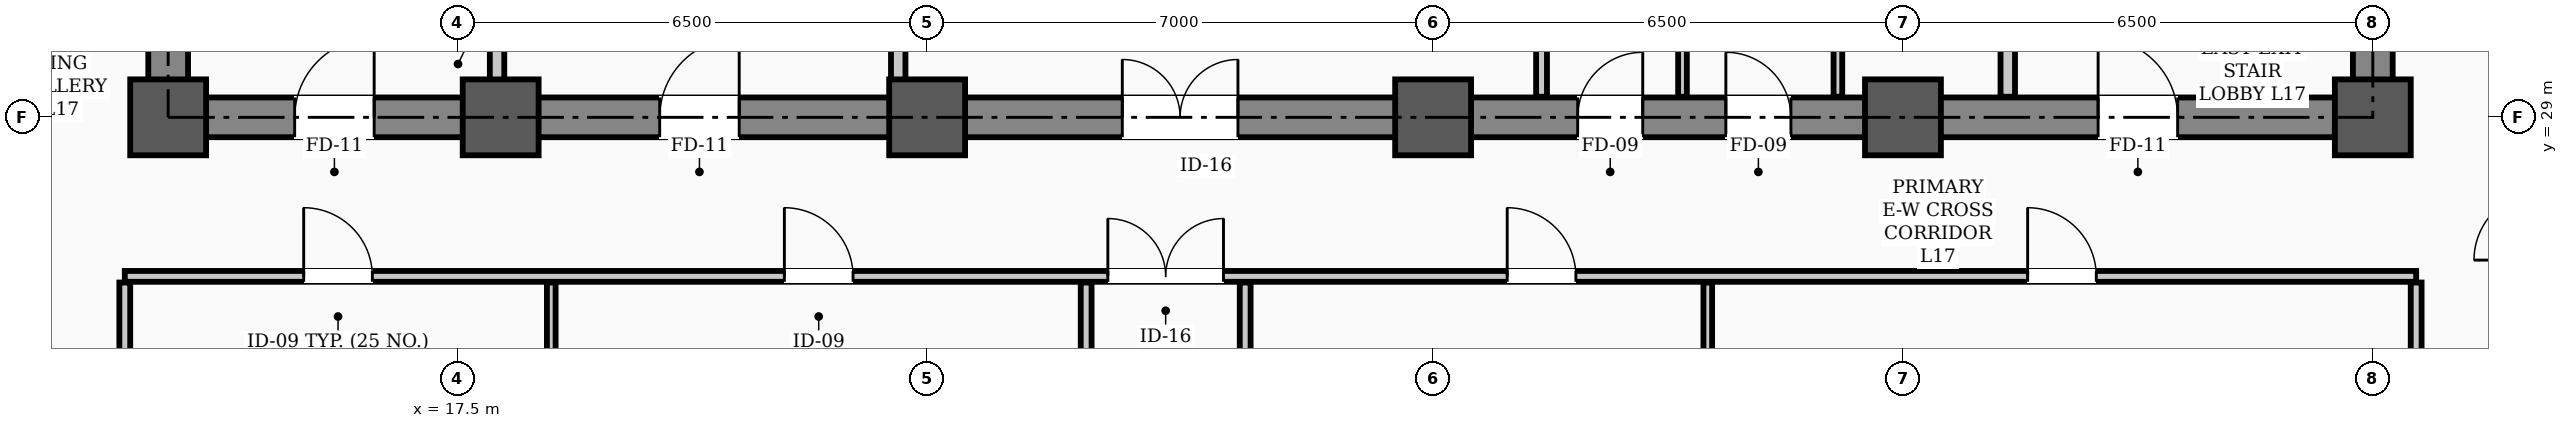
"""IFC4 building model, lengths in metres.
Left out: names, types, materials, properties, quantities, classifications, styles, units other than length and angle.
Written with IfcOpenShell. Run it as: python <this file> out.ifc"""

import sys

from ifc_helpers import new_model, si_unit, direction, frame, frame_2d, origin, origin_2d, place, context, subcontext, project, spatial, rectangle, hollow_rectangle, extrude, element, fill, save


model = new_model("IFC4")
c1 = context("Model", 3, precision=1e-05, world=origin(), true_north=direction((0.0, 1.0)))
c2 = subcontext(c1, "Body", "Model", "MODEL_VIEW")
j1 = project(units=[si_unit("LENGTHUNIT", "METRE"), si_unit("PLANEANGLEUNIT", "RADIAN")], contexts=[c1])
p1 = place(None, origin())
s1 = spatial("IfcSite", under=j1, at=p1, CompositionType="ELEMENT")
p2 = place(p1, origin())
s2 = spatial("IfcBuilding", under=s1, at=p2, CompositionType="ELEMENT")
p3 = place(p2, frame((0.0, 0.0, 69.4)))
s3 = spatial("IfcBuildingStorey", under=s2, at=p3, CompositionType="ELEMENT", Elevation=69.4)
for number, where, z_axis, x_axis in (
    (1, (13.5, 29.0, 0.0), (0.0, 0.0, 1.0), (1.0, 0.0, 0.0)),
    (2, (18.1, 29.0, 0.0), (0.0, 0.0, 1.0), (1.0, 0.0, 0.0)),
    (3, (24.0, 29.0, 0.0), (0.0, 0.0, 1.0), (1.0, 0.0, 0.0)),
    (4, (31.0, 29.0, 0.0), (0.0, 0.0, 1.0), (1.0, 0.0, 0.0)),
    (5, (37.5, 29.0, 0.0), (0.0, 0.0, 1.0), (1.0, 0.0, 0.0)),
    (6, (44.0, 29.0, 0.0), (0.0, 0.0, 1.0), (1.0, 0.0, 0.0)),
):
    element("IfcColumn", number, at=place(p3, frame(where, z_axis=z_axis, x_axis=x_axis)), inside=s3, PredefinedType="COLUMN", context=c2, shape_type="SweptSolid", body=[
        extrude(hollow_rectangle(XDim=1.05, YDim=1.05, WallThickness=0.038, InnerFilletRadius=0.019, OuterFilletRadius=0.057, at=origin_2d()), origin(), (0.0, 0.0, 1.0), 3.9),
    ])
p4 = place(p3, frame((13.5, 29.0, 0.0), z_axis=(0.0, 0.0, 1.0), x_axis=(1.0, 0.0, 0.0)))
e7 = element("IfcWall", 7, at=p4, inside=s3, PredefinedType="SHEAR", context=c2, shape_type="SweptSolid", body=[
    extrude(rectangle(XDim=30.5, YDim=0.55, at=frame_2d((15.25, 0.0))), origin(), (0.0, 0.0, 1.0), 3.72),
])
p5 = place(p4, frame((1.75, 0.0, 0.0)))
e8 = element("IfcOpeningElement", 8, at=p5, cuts=e7, PredefinedType="OPENING", context=c2, shape_type="SweptSolid", body=[
    extrude(rectangle(XDim=1.1, YDim=2.08, at=frame_2d((0.55, 1.04))), frame((0.0, 0.285, 0.0), z_axis=(0.0, -1.0, 0.0), x_axis=(1.0, 0.0, 0.0)), (0.0, 0.0, 1.0), 0.57),
])
p6 = place(p4, frame((26.7, 0.0, 0.0)))
e9 = element("IfcOpeningElement", 9, at=p6, cuts=e7, PredefinedType="OPENING", context=c2, shape_type="SweptSolid", body=[
    extrude(rectangle(XDim=1.1, YDim=2.08, at=frame_2d((0.55, 1.04))), frame((0.0, 0.285, 0.0), z_axis=(0.0, -1.0, 0.0), x_axis=(1.0, 0.0, 0.0)), (0.0, 0.0, 1.0), 0.57),
])
p7 = place(p4, frame((6.8, 0.0, 0.0)))
e10 = element("IfcOpeningElement", 10, at=p7, cuts=e7, PredefinedType="OPENING", context=c2, shape_type="SweptSolid", body=[
    extrude(rectangle(XDim=1.1, YDim=2.08, at=frame_2d((0.55, 1.04))), frame((0.0, 0.285, 0.0), z_axis=(0.0, -1.0, 0.0), x_axis=(1.0, 0.0, 0.0)), (0.0, 0.0, 1.0), 0.57),
])
p8 = place(p4, frame((13.2, 0.0, 0.0)))
e11 = element("IfcOpeningElement", 11, at=p8, cuts=e7, PredefinedType="OPENING", context=c2, shape_type="SweptSolid", body=[
    extrude(rectangle(XDim=1.6, YDim=2.08, at=frame_2d((0.8, 1.04))), frame((0.0, 0.285, 0.0), z_axis=(0.0, -1.0, 0.0), x_axis=(1.0, 0.0, 0.0)), (0.0, 0.0, 1.0), 0.57),
])
p9 = place(p4, frame((19.5, 0.0, 0.0)))
e12 = element("IfcOpeningElement", 12, at=p9, cuts=e7, PredefinedType="OPENING", context=c2, shape_type="SweptSolid", body=[
    extrude(rectangle(XDim=0.9, YDim=2.08, at=frame_2d((0.45, 1.04))), frame((0.0, 0.285, 0.0), z_axis=(0.0, -1.0, 0.0), x_axis=(1.0, 0.0, 0.0)), (0.0, 0.0, 1.0), 0.57),
])
p10 = place(p4, frame((21.55, 0.0, 0.0)))
e13 = element("IfcOpeningElement", 13, at=p10, cuts=e7, PredefinedType="OPENING", context=c2, shape_type="SweptSolid", body=[
    extrude(rectangle(XDim=0.9, YDim=2.08, at=frame_2d((0.45, 1.04))), frame((0.0, 0.285, 0.0), z_axis=(0.0, -1.0, 0.0), x_axis=(1.0, 0.0, 0.0)), (0.0, 0.0, 1.0), 0.57),
])
for number, where, z_axis, x_axis in (
    (14, (13.5, 29.35, 0.0), (0.0, 0.0, 1.0), (0.0, 1.0, 0.0)),
    (15, (44.0, 29.35, 0.0), (0.0, 0.0, 1.0), (0.0, 1.0, 0.0)),
):
    element("IfcWall", number, at=place(p3, frame(where, z_axis=z_axis, x_axis=x_axis)), inside=s3, PredefinedType="SHEAR", context=c2, shape_type="SweptSolid", body=[
        extrude(rectangle(XDim=8.6, YDim=0.55, at=frame_2d((4.3, 0.0))), origin(), (0.0, 0.0, 1.0), 3.72),
    ])
p11 = place(p3, frame((12.9, 26.8, 0.0), z_axis=(0.0, 0.0, 1.0), x_axis=(1.0, 0.0, 0.0)))
e16 = element("IfcWall", 16, at=p11, inside=s3, PredefinedType="PARTITIONING", context=c2, shape_type="SweptSolid", body=[
    extrude(rectangle(XDim=31.7, YDim=0.15, at=frame_2d((15.85, 0.0))), origin(), (0.0, 0.0, 1.0), 3.1),
])
p12 = place(p11, frame((13.6, 0.0, 0.0)))
e17 = element("IfcOpeningElement", 17, at=p12, cuts=e16, PredefinedType="OPENING", context=c2, shape_type="SweptSolid", body=[
    extrude(rectangle(XDim=1.6, YDim=2.08, at=frame_2d((0.8, 1.04))), frame((0.0, 0.085, 0.0), z_axis=(0.0, -1.0, 0.0), x_axis=(1.0, 0.0, 0.0)), (0.0, 0.0, 1.0), 0.17),
])
p13 = place(p11, frame((2.475, 0.0, 0.0)))
e18 = element("IfcOpeningElement", 18, at=p13, cuts=e16, PredefinedType="OPENING", context=c2, shape_type="SweptSolid", body=[
    extrude(rectangle(XDim=0.95, YDim=2.08, at=frame_2d((0.475, 1.04))), frame((0.0, 0.085, 0.0), z_axis=(0.0, -1.0, 0.0), x_axis=(1.0, 0.0, 0.0)), (0.0, 0.0, 1.0), 0.17),
])
p14 = place(p11, frame((9.125, 0.0, 0.0)))
e19 = element("IfcOpeningElement", 19, at=p14, cuts=e16, PredefinedType="OPENING", context=c2, shape_type="SweptSolid", body=[
    extrude(rectangle(XDim=0.95, YDim=2.08, at=frame_2d((0.475, 1.04))), frame((0.0, 0.085, 0.0), z_axis=(0.0, -1.0, 0.0), x_axis=(1.0, 0.0, 0.0)), (0.0, 0.0, 1.0), 0.17),
])
p15 = place(p11, frame((19.125, 0.0, 0.0)))
e20 = element("IfcOpeningElement", 20, at=p15, cuts=e16, PredefinedType="OPENING", context=c2, shape_type="SweptSolid", body=[
    extrude(rectangle(XDim=0.95, YDim=2.08, at=frame_2d((0.475, 1.04))), frame((0.0, 0.085, 0.0), z_axis=(0.0, -1.0, 0.0), x_axis=(1.0, 0.0, 0.0)), (0.0, 0.0, 1.0), 0.17),
])
p16 = place(p11, frame((26.325, 0.0, 0.0)))
e21 = element("IfcOpeningElement", 21, at=p16, cuts=e16, PredefinedType="OPENING", context=c2, shape_type="SweptSolid", body=[
    extrude(rectangle(XDim=0.95, YDim=2.08, at=frame_2d((0.475, 1.04))), frame((0.0, 0.085, 0.0), z_axis=(0.0, -1.0, 0.0), x_axis=(1.0, 0.0, 0.0)), (0.0, 0.0, 1.0), 0.17),
])
for number, where, z_axis, x_axis in (
    (22, (18.05, 29.285, 0.0), (0.0, 0.0, 1.0), (0.0, 1.0, 0.0)),
    (23, (38.95, 29.285, 0.0), (0.0, 0.0, 1.0), (0.0, 1.0, 0.0)),
):
    element("IfcWall", number, at=place(p3, frame(where, z_axis=z_axis, x_axis=x_axis)), inside=s3, PredefinedType="STANDARD", context=c2, shape_type="SweptSolid", body=[
        extrude(rectangle(XDim=1.015, YDim=0.2, at=frame_2d((0.508, 0.0))), origin(), (0.0, 0.0, 1.0), 3.3),
    ])
p17 = place(p3, frame((23.6, 29.285, 0.0), z_axis=(0.0, 0.0, 1.0), x_axis=(0.0, 1.0, 0.0)))
e24 = element("IfcWall", 24, at=p17, inside=s3, PredefinedType="STANDARD", context=c2, shape_type="SweptSolid", body=[
    extrude(rectangle(XDim=5.415, YDim=0.2, at=frame_2d((2.708, 0.0))), origin(), (0.0, 0.0, 1.0), 3.1),
])
p18 = place(p3, frame((32.5, 29.285, 0.0), z_axis=(0.0, 0.0, 1.0), x_axis=(0.0, 1.0, 0.0)))
e25 = element("IfcWall", 25, at=p18, inside=s3, PredefinedType="PARTITIONING", context=c2, shape_type="SweptSolid", body=[
    extrude(rectangle(XDim=2.48, YDim=0.15, at=frame_2d((1.24, 0.0))), origin(), (0.0, 0.0, 1.0), 3.3),
])
for number, where, z_axis, x_axis in (
    (26, (36.6, 29.285, 0.0), (0.0, 0.0, 1.0), (0.0, 1.0, 0.0)),
    (27, (34.45, 29.285, 0.0), (0.0, 0.0, 1.0), (0.0, 1.0, 0.0)),
):
    element("IfcWall", number, at=place(p3, frame(where, z_axis=z_axis, x_axis=x_axis)), inside=s3, PredefinedType="PARTITIONING", context=c2, shape_type="SweptSolid", body=[
        extrude(rectangle(XDim=2.48, YDim=0.12, at=frame_2d((1.24, 0.0))), origin(), (0.0, 0.0, 1.0), 3.3),
    ])
for number, where, z_axis, x_axis in (
    (28, (26.2, 19.335, 0.0), (0.0, 0.0, 1.0), (0.0, 1.0, 0.0)),
    (29, (28.4, 19.335, 0.0), (0.0, 0.0, 1.0), (0.0, 1.0, 0.0)),
    (30, (12.9, 19.335, 0.0), (0.0, 0.0, 1.0), (0.0, 1.0, 0.0)),
    (31, (44.6, 19.335, 0.0), (0.0, 0.0, 1.0), (0.0, 1.0, 0.0)),
):
    element("IfcWall", number, at=place(p3, frame(where, z_axis=z_axis, x_axis=x_axis)), inside=s3, PredefinedType="PARTITIONING", context=c2, shape_type="SweptSolid", body=[
        extrude(rectangle(XDim=7.38, YDim=0.15, at=frame_2d((3.69, 0.0))), origin(), (0.0, 0.0, 1.0), 3.0),
    ])
for number, where, z_axis, x_axis in (
    (32, (18.8, 19.335, 0.0), (0.0, 0.0, 1.0), (0.0, 1.0, 0.0)),
    (33, (34.8, 19.335, 0.0), (0.0, 0.0, 1.0), (0.0, 1.0, 0.0)),
):
    element("IfcWall", number, at=place(p3, frame(where, z_axis=z_axis, x_axis=x_axis)), inside=s3, PredefinedType="PARTITIONING", context=c2, shape_type="SweptSolid", body=[
        extrude(rectangle(XDim=7.38, YDim=0.12, at=frame_2d((3.69, 0.0))), origin(), (0.0, 0.0, 1.0), 3.0),
    ])
p19 = place(p5, origin())
e34 = element("IfcDoor", 34, at=p19, inside=s3, OperationType="SINGLE_SWING_RIGHT", PredefinedType="DOOR", context=c2, shape_type="SweptSolid", body=[
    extrude(rectangle(XDim=1.1, YDim=2.08, at=frame_2d((0.55, 1.04))), frame((0.0, 0.025, 0.0), z_axis=(0.0, -1.0, 0.0), x_axis=(1.0, 0.0, 0.0)), (0.0, 0.0, 1.0), 0.05),
])
fill(e8, e34)
p20 = place(p6, origin())
e35 = element("IfcDoor", 35, at=p20, inside=s3, OperationType="SINGLE_SWING_LEFT", PredefinedType="DOOR", context=c2, shape_type="SweptSolid", body=[
    extrude(rectangle(XDim=1.1, YDim=2.08, at=frame_2d((0.55, 1.04))), frame((0.0, 0.025, 0.0), z_axis=(0.0, -1.0, 0.0), x_axis=(1.0, 0.0, 0.0)), (0.0, 0.0, 1.0), 0.05),
])
fill(e9, e35)
p21 = place(p7, origin())
e36 = element("IfcDoor", 36, at=p21, inside=s3, OperationType="SINGLE_SWING_RIGHT", PredefinedType="DOOR", context=c2, shape_type="SweptSolid", body=[
    extrude(rectangle(XDim=1.1, YDim=2.08, at=frame_2d((0.55, 1.04))), frame((0.0, 0.025, 0.0), z_axis=(0.0, -1.0, 0.0), x_axis=(1.0, 0.0, 0.0)), (0.0, 0.0, 1.0), 0.05),
])
fill(e10, e36)
p22 = place(p8, origin())
e37 = element("IfcDoor", 37, at=p22, inside=s3, OperationType="DOUBLE_DOOR_SINGLE_SWING", PredefinedType="DOOR", context=c2, shape_type="SweptSolid", body=[
    extrude(rectangle(XDim=1.6, YDim=2.08, at=frame_2d((0.8, 1.04))), frame((0.0, 0.025, 0.0), z_axis=(0.0, -1.0, 0.0), x_axis=(1.0, 0.0, 0.0)), (0.0, 0.0, 1.0), 0.05),
])
fill(e11, e37)
p23 = place(p9, origin())
e38 = element("IfcDoor", 38, at=p23, inside=s3, OperationType="SINGLE_SWING_RIGHT", PredefinedType="DOOR", context=c2, shape_type="SweptSolid", body=[
    extrude(rectangle(XDim=0.9, YDim=2.08, at=frame_2d((0.45, 1.04))), frame((0.0, 0.025, 0.0), z_axis=(0.0, -1.0, 0.0), x_axis=(1.0, 0.0, 0.0)), (0.0, 0.0, 1.0), 0.05),
])
fill(e12, e38)
p24 = place(p10, origin())
e39 = element("IfcDoor", 39, at=p24, inside=s3, OperationType="SINGLE_SWING_LEFT", PredefinedType="DOOR", context=c2, shape_type="SweptSolid", body=[
    extrude(rectangle(XDim=0.9, YDim=2.08, at=frame_2d((0.45, 1.04))), frame((0.0, 0.025, 0.0), z_axis=(0.0, -1.0, 0.0), x_axis=(1.0, 0.0, 0.0)), (0.0, 0.0, 1.0), 0.05),
])
fill(e13, e39)
p25 = place(p12, origin())
e40 = element("IfcDoor", 40, at=p25, inside=s3, OperationType="DOUBLE_DOOR_SINGLE_SWING", PredefinedType="DOOR", context=c2, shape_type="SweptSolid", body=[
    extrude(rectangle(XDim=1.6, YDim=2.08, at=frame_2d((0.8, 1.04))), frame((0.0, 0.025, 0.0), z_axis=(0.0, -1.0, 0.0), x_axis=(1.0, 0.0, 0.0)), (0.0, 0.0, 1.0), 0.05),
])
fill(e17, e40)
p26 = place(p13, origin())
e41 = element("IfcDoor", 41, at=p26, inside=s3, OperationType="SINGLE_SWING_LEFT", PredefinedType="DOOR", context=c2, shape_type="SweptSolid", body=[
    extrude(rectangle(XDim=0.95, YDim=2.08, at=frame_2d((0.475, 1.04))), frame((0.0, 0.025, 0.0), z_axis=(0.0, -1.0, 0.0), x_axis=(1.0, 0.0, 0.0)), (0.0, 0.0, 1.0), 0.05),
])
fill(e18, e41)
p27 = place(p14, origin())
e42 = element("IfcDoor", 42, at=p27, inside=s3, OperationType="SINGLE_SWING_LEFT", PredefinedType="DOOR", context=c2, shape_type="SweptSolid", body=[
    extrude(rectangle(XDim=0.95, YDim=2.08, at=frame_2d((0.475, 1.04))), frame((0.0, 0.025, 0.0), z_axis=(0.0, -1.0, 0.0), x_axis=(1.0, 0.0, 0.0)), (0.0, 0.0, 1.0), 0.05),
])
fill(e19, e42)
p28 = place(p15, origin())
e43 = element("IfcDoor", 43, at=p28, inside=s3, OperationType="SINGLE_SWING_LEFT", PredefinedType="DOOR", context=c2, shape_type="SweptSolid", body=[
    extrude(rectangle(XDim=0.95, YDim=2.08, at=frame_2d((0.475, 1.04))), frame((0.0, 0.025, 0.0), z_axis=(0.0, -1.0, 0.0), x_axis=(1.0, 0.0, 0.0)), (0.0, 0.0, 1.0), 0.05),
])
fill(e20, e43)
p29 = place(p16, origin())
e44 = element("IfcDoor", 44, at=p29, inside=s3, OperationType="SINGLE_SWING_LEFT", PredefinedType="DOOR", context=c2, shape_type="SweptSolid", body=[
    extrude(rectangle(XDim=0.95, YDim=2.08, at=frame_2d((0.475, 1.04))), frame((0.0, 0.025, 0.0), z_axis=(0.0, -1.0, 0.0), x_axis=(1.0, 0.0, 0.0)), (0.0, 0.0, 1.0), 0.05),
])
fill(e21, e44)
save(model, sys.argv[1])
